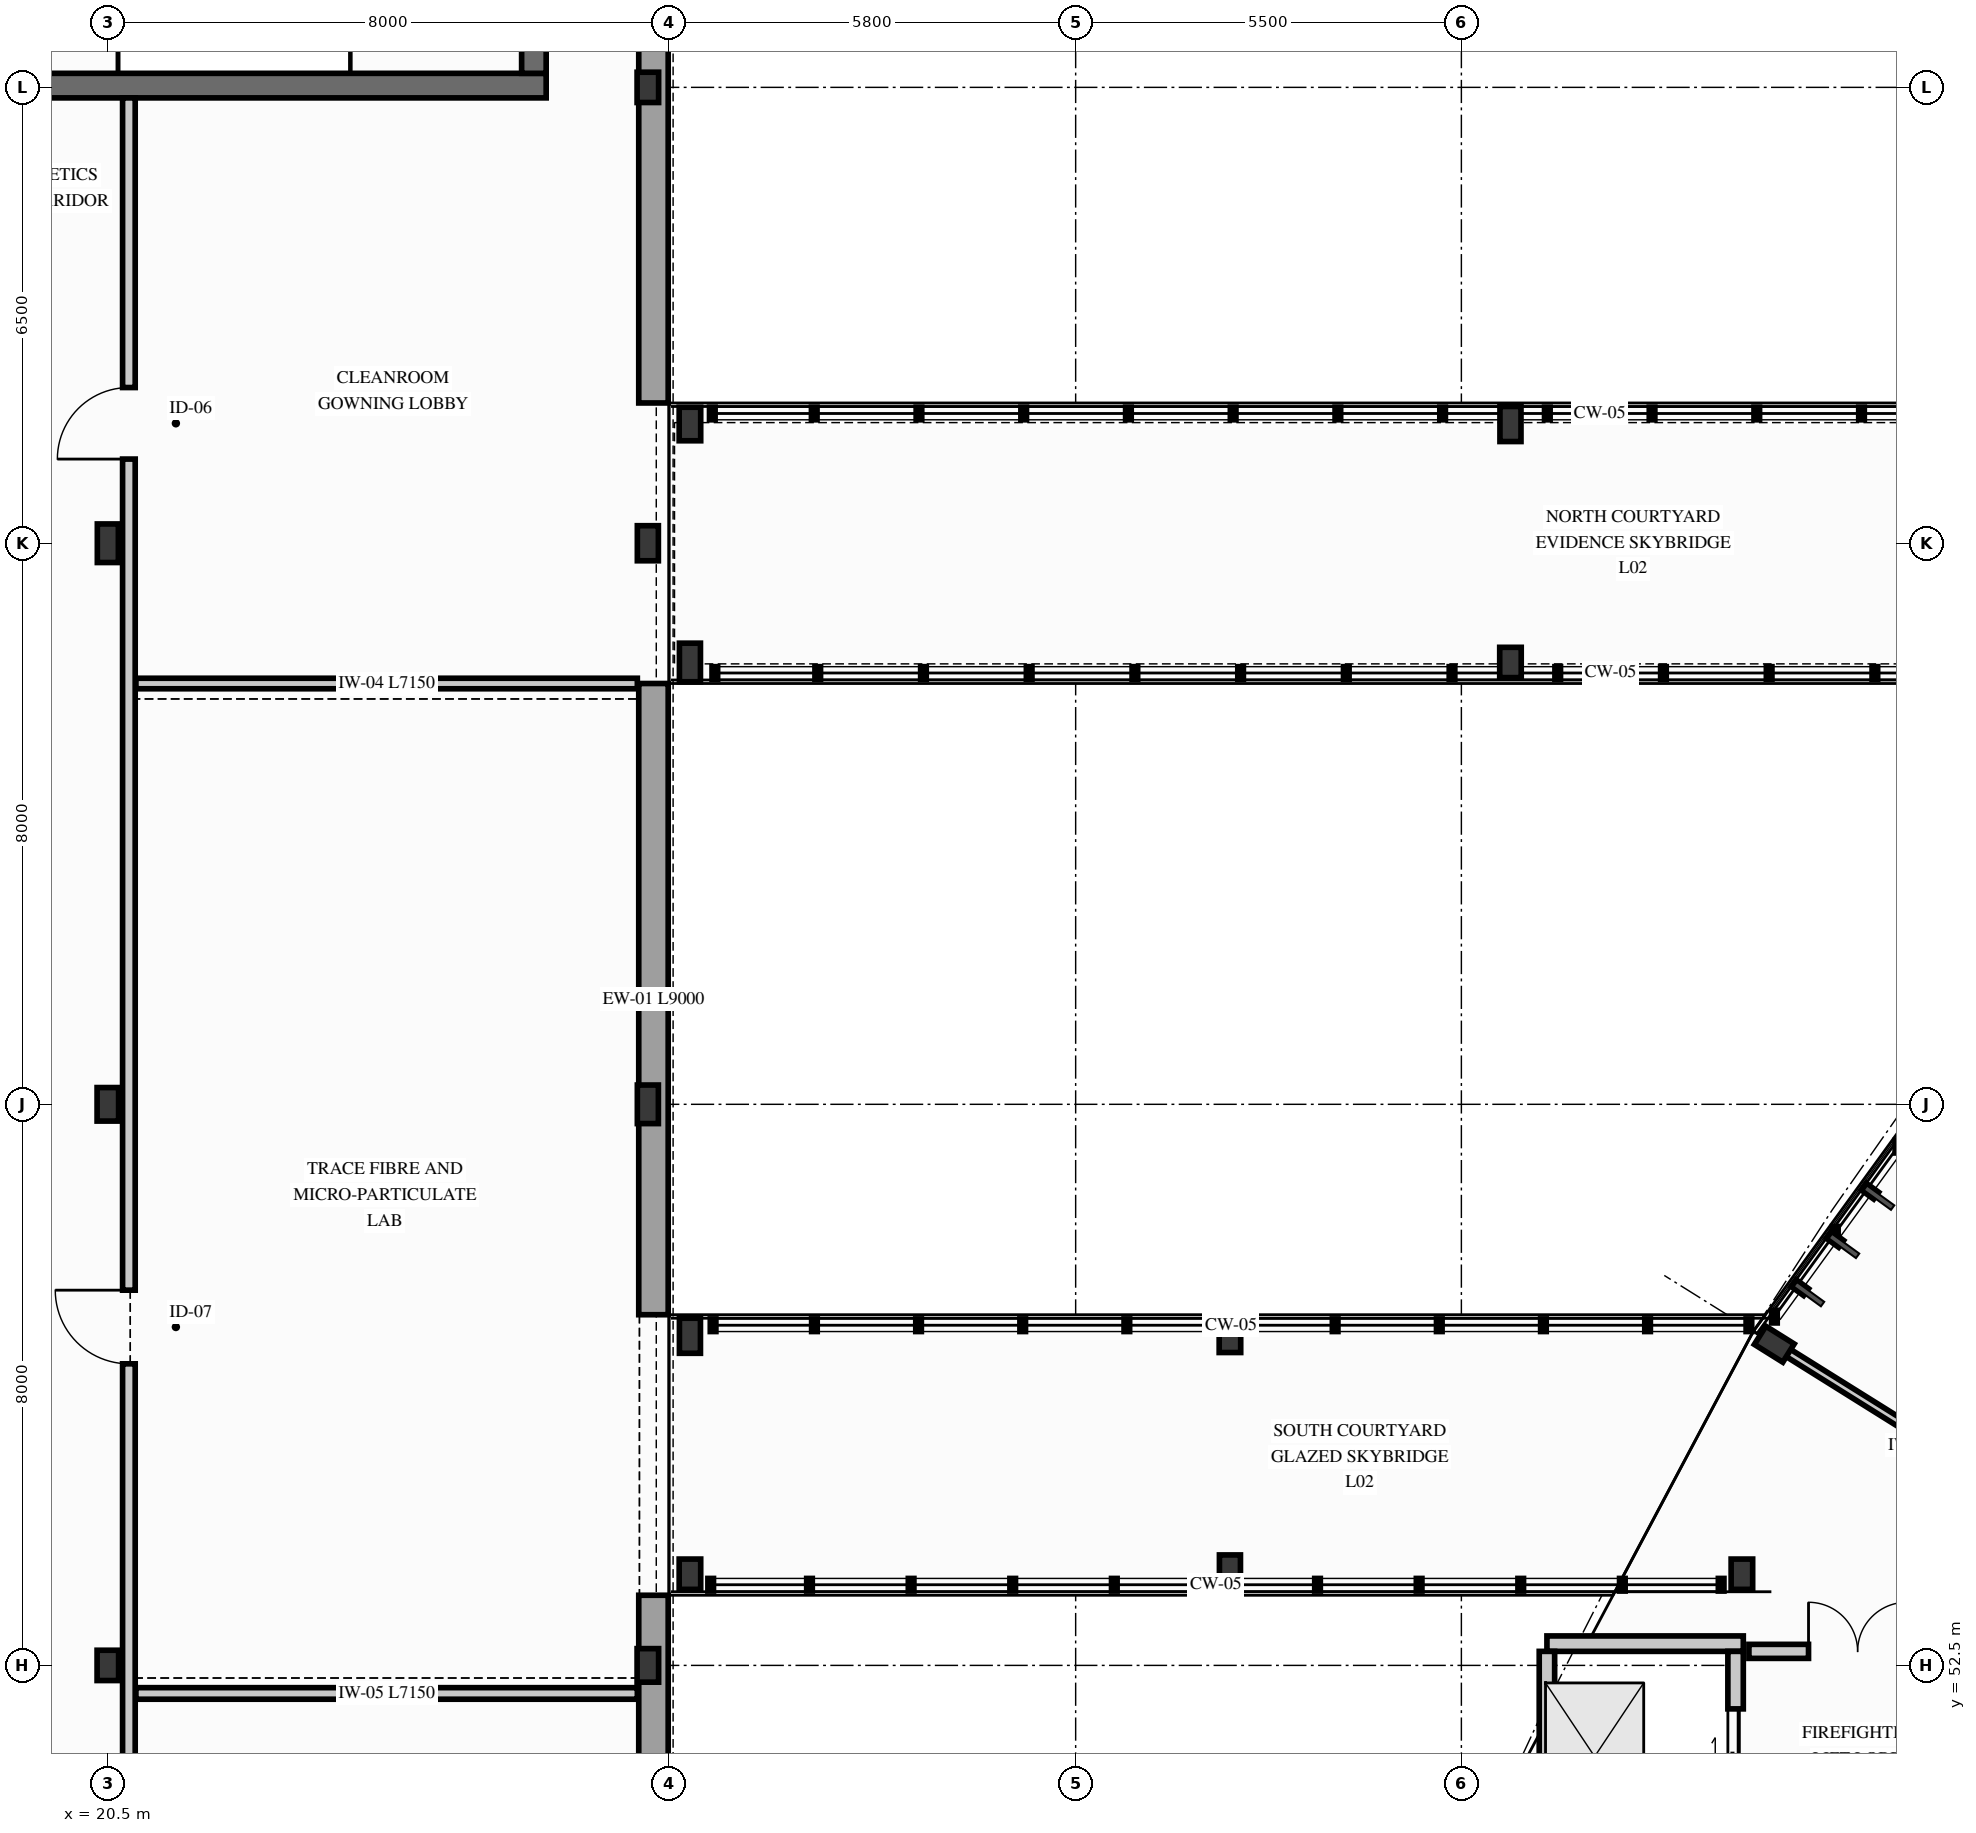
"""IFC4 building model, lengths in metres.
Left out: names, types, materials, properties, quantities, classifications, styles, units other than length and angle.
Written with IfcOpenShell. Run it as: python <this file> out.ifc"""

import sys

from ifc_helpers import new_model, si_unit, direction, frame, frame_2d, origin, origin_2d, place, context, subcontext, project, spatial, rectangle, i_section, extrude, element, fill, save


model = new_model("IFC4")
c1 = context("Model", 3, precision=1e-05, world=origin(), true_north=direction((0.0, 1.0)))
c2 = subcontext(c1, "Body", "Model", "MODEL_VIEW")
j1 = project(units=[si_unit("LENGTHUNIT", "METRE"), si_unit("PLANEANGLEUNIT", "RADIAN")], contexts=[c1])
p1 = place(None, origin())
s1 = spatial("IfcSite", under=j1, at=p1, CompositionType="ELEMENT")
p2 = place(p1, origin())
s2 = spatial("IfcBuilding", under=s1, at=p2, CompositionType="ELEMENT")
p3 = place(p2, frame((0.0, 0.0, 9.3)))
s3 = spatial("IfcBuildingStorey", under=s2, at=p3, CompositionType="ELEMENT", Elevation=9.3)
p4 = place(p3, frame((18.45, 75.025, 0.0), z_axis=(0.0, 0.0, 1.0), x_axis=(1.0, 0.0, 0.0)))
e1 = element("IfcWall", 1, at=p4, inside=s3, PredefinedType="SHEAR", context=c2, shape_type="SweptSolid", body=[
    extrude(rectangle(XDim=8.3, YDim=0.35, at=frame_2d((4.15, 0.0))), origin(), (0.0, 0.0, 1.0), 4.0),
])
p5 = place(p3, frame((26.575, 75.2, 0.0), z_axis=(0.0, 0.0, 1.0), x_axis=(0.0, 1.0, 0.0)))
e2 = element("IfcWall", 2, at=p5, inside=s3, PredefinedType="SHEAR", context=c2, shape_type="SweptSolid", body=[
    extrude(rectangle(XDim=6.8, YDim=0.35, at=frame_2d((3.4, 0.0))), origin(), (0.0, 0.0, 1.0), 4.0),
])
p6 = place(p3, frame((44.262, 57.08, 0.0), z_axis=(0.0, 0.0, 1.0), x_axis=(0.529919264233, 0.848048096156, 0.0)))
e3 = element("IfcColumn", 3, at=p6, inside=s3, PredefinedType="COLUMN", context=c2, shape_type="SweptSolid", body=[
    extrude(i_section(OverallWidth=0.307, OverallDepth=0.478, WebThickness=0.021, FlangeThickness=0.04, FilletRadius=0.027, at=origin_2d()), origin(), (0.0, 0.0, 1.0), 4.2),
])
p7 = place(p3, frame((43.8, 53.8, 0.0), z_axis=(0.0, 0.0, 1.0), x_axis=(1.0, 0.0, 0.0)))
e4 = element("IfcColumn", 4, at=p7, inside=s3, PredefinedType="COLUMN", context=c2, shape_type="SweptSolid", body=[
    extrude(i_section(OverallWidth=0.307, OverallDepth=0.432, WebThickness=0.021, FlangeThickness=0.04, FilletRadius=0.027, at=origin_2d()), origin(), (0.0, 0.0, 1.0), 4.2),
])
p8 = place(p3, frame((36.5, 57.2, 0.0), z_axis=(0.0, 0.0, 1.0), x_axis=(1.0, 0.0, 0.0)))
e5 = element("IfcColumn", 5, at=p8, inside=s3, PredefinedType="COLUMN", context=c2, shape_type="SweptSolid", body=[
    extrude(i_section(OverallWidth=0.307, OverallDepth=0.478, WebThickness=0.021, FlangeThickness=0.04, FilletRadius=0.027, at=origin_2d()), origin(), (0.0, 0.0, 1.0), 4.2),
])
p9 = place(p3, frame((36.5, 53.8, 0.0), z_axis=(0.0, 0.0, 1.0), x_axis=(1.0, 0.0, 0.0)))
e6 = element("IfcColumn", 6, at=p9, inside=s3, PredefinedType="COLUMN", context=c2, shape_type="SweptSolid", body=[
    extrude(i_section(OverallWidth=0.3, OverallDepth=0.55, WebThickness=0.015, FlangeThickness=0.029, FilletRadius=0.027, at=origin_2d()), origin(), (0.0, 0.0, 1.0), 4.2),
])
p10 = place(p3, frame((28.8, 57.2, 0.0), z_axis=(0.0, 0.0, 1.0), x_axis=(1.0, 0.0, 0.0)))
e7 = element("IfcColumn", 7, at=p10, inside=s3, PredefinedType="COLUMN", context=c2, shape_type="SweptSolid", body=[
    extrude(i_section(OverallWidth=0.3, OverallDepth=0.5, WebThickness=0.014, FlangeThickness=0.028, FilletRadius=0.027, at=origin_2d()), origin(), (0.0, 0.0, 1.0), 4.2),
])
p11 = place(p3, frame((28.8, 53.8, 0.0), z_axis=(0.0, 0.0, 1.0), x_axis=(1.0, 0.0, 0.0)))
e8 = element("IfcColumn", 8, at=p11, inside=s3, PredefinedType="COLUMN", context=c2, shape_type="SweptSolid", body=[
    extrude(i_section(OverallWidth=0.307, OverallDepth=0.432, WebThickness=0.021, FlangeThickness=0.04, FilletRadius=0.027, at=origin_2d()), origin(), (0.0, 0.0, 1.0), 4.2),
])
p12 = place(p3, frame((40.5, 70.2, 0.0), z_axis=(0.0, 0.0, 1.0), x_axis=(1.0, 0.0, 0.0)))
e9 = element("IfcColumn", 9, at=p12, inside=s3, PredefinedType="COLUMN", context=c2, shape_type="SweptSolid", body=[
    extrude(i_section(OverallWidth=0.3, OverallDepth=0.5, WebThickness=0.014, FlangeThickness=0.028, FilletRadius=0.027, at=origin_2d()), origin(), (0.0, 0.0, 1.0), 3.94),
])
p13 = place(p3, frame((40.5, 66.8, 0.0), z_axis=(0.0, 0.0, 1.0), x_axis=(1.0, 0.0, 0.0)))
e10 = element("IfcColumn", 10, at=p13, inside=s3, PredefinedType="COLUMN", context=c2, shape_type="SweptSolid", body=[
    extrude(i_section(OverallWidth=0.307, OverallDepth=0.432, WebThickness=0.021, FlangeThickness=0.04, FilletRadius=0.027, at=origin_2d()), origin(), (0.0, 0.0, 1.0), 3.94),
])
p14 = place(p3, frame((28.8, 70.2, 0.0), z_axis=(0.0, 0.0, 1.0), x_axis=(1.0, 0.0, 0.0)))
e11 = element("IfcColumn", 11, at=p14, inside=s3, PredefinedType="COLUMN", context=c2, shape_type="SweptSolid", body=[
    extrude(i_section(OverallWidth=0.307, OverallDepth=0.478, WebThickness=0.021, FlangeThickness=0.04, FilletRadius=0.027, at=origin_2d()), origin(), (0.0, 0.0, 1.0), 3.94),
])
p15 = place(p3, frame((28.8, 66.8, 0.0), z_axis=(0.0, 0.0, 1.0), x_axis=(1.0, 0.0, 0.0)))
e12 = element("IfcColumn", 12, at=p15, inside=s3, PredefinedType="COLUMN", context=c2, shape_type="SweptSolid", body=[
    extrude(i_section(OverallWidth=0.3, OverallDepth=0.55, WebThickness=0.015, FlangeThickness=0.029, FilletRadius=0.027, at=origin_2d()), origin(), (0.0, 0.0, 1.0), 3.94),
])
p16 = place(p3, frame((20.5, 52.5, 0.0), z_axis=(0.0, 0.0, 1.0), x_axis=(1.0, 0.0, 0.0)))
e13 = element("IfcColumn", 13, at=p16, inside=s3, PredefinedType="COLUMN", context=c2, shape_type="SweptSolid", body=[
    extrude(i_section(OverallWidth=0.307, OverallDepth=0.432, WebThickness=0.021, FlangeThickness=0.04, FilletRadius=0.027, at=origin_2d()), origin(), (0.0, 0.0, 1.0), 4.2),
])
p17 = place(p3, frame((20.5, 60.5, 0.0), z_axis=(0.0, 0.0, 1.0), x_axis=(1.0, 0.0, 0.0)))
e14 = element("IfcColumn", 14, at=p17, inside=s3, PredefinedType="COLUMN", context=c2, shape_type="SweptSolid", body=[
    extrude(i_section(OverallWidth=0.307, OverallDepth=0.478, WebThickness=0.021, FlangeThickness=0.04, FilletRadius=0.027, at=origin_2d()), origin(), (0.0, 0.0, 1.0), 4.2),
])
p18 = place(p3, frame((20.5, 68.5, 0.0), z_axis=(0.0, 0.0, 1.0), x_axis=(1.0, 0.0, 0.0)))
e15 = element("IfcColumn", 15, at=p18, inside=s3, PredefinedType="COLUMN", context=c2, shape_type="SweptSolid", body=[
    extrude(i_section(OverallWidth=0.3, OverallDepth=0.55, WebThickness=0.015, FlangeThickness=0.029, FilletRadius=0.027, at=origin_2d()), origin(), (0.0, 0.0, 1.0), 4.2),
])
p19 = place(p3, frame((28.2, 52.5, 0.0), z_axis=(0.0, 0.0, 1.0), x_axis=(1.0, 0.0, 0.0)))
e16 = element("IfcColumn", 16, at=p19, inside=s3, PredefinedType="COLUMN", context=c2, shape_type="SweptSolid", body=[
    extrude(i_section(OverallWidth=0.307, OverallDepth=0.478, WebThickness=0.021, FlangeThickness=0.04, FilletRadius=0.027, at=origin_2d()), origin(), (0.0, 0.0, 1.0), 4.2),
])
p20 = place(p3, frame((28.2, 60.5, 0.0), z_axis=(0.0, 0.0, 1.0), x_axis=(1.0, 0.0, 0.0)))
e17 = element("IfcColumn", 17, at=p20, inside=s3, PredefinedType="COLUMN", context=c2, shape_type="SweptSolid", body=[
    extrude(i_section(OverallWidth=0.3, OverallDepth=0.55, WebThickness=0.015, FlangeThickness=0.029, FilletRadius=0.027, at=origin_2d()), origin(), (0.0, 0.0, 1.0), 4.2),
])
p21 = place(p3, frame((28.2, 68.5, 0.0), z_axis=(0.0, 0.0, 1.0), x_axis=(1.0, 0.0, 0.0)))
e18 = element("IfcColumn", 18, at=p21, inside=s3, PredefinedType="COLUMN", context=c2, shape_type="SweptSolid", body=[
    extrude(i_section(OverallWidth=0.3, OverallDepth=0.5, WebThickness=0.014, FlangeThickness=0.028, FilletRadius=0.027, at=origin_2d()), origin(), (0.0, 0.0, 1.0), 4.2),
])
p22 = place(p3, frame((28.2, 75.0, 0.0), z_axis=(0.0, 0.0, 1.0), x_axis=(1.0, 0.0, 0.0)))
e19 = element("IfcColumn", 19, at=p22, inside=s3, PredefinedType="COLUMN", context=c2, shape_type="SweptSolid", body=[
    extrude(i_section(OverallWidth=0.307, OverallDepth=0.432, WebThickness=0.021, FlangeThickness=0.04, FilletRadius=0.027, at=origin_2d()), origin(), (0.0, 0.0, 1.0), 4.2),
])
p23 = place(p3, frame((28.28, 36.5, 0.0), z_axis=(0.0, 0.0, 1.0), x_axis=(0.0, 1.0, 0.0)))
e20 = element("IfcWall", 20, at=p23, inside=s3, PredefinedType="SOLIDWALL", context=c2, shape_type="SweptSolid", body=[
    extrude(rectangle(XDim=17.0, YDim=0.42, at=frame_2d((8.5, 0.0))), origin(), (0.0, 0.0, 1.0), 3.68),
])
p24 = place(p23, frame((1.65, 0.0, 0.74)))
e21 = element("IfcOpeningElement", 21, at=p24, cuts=e20, PredefinedType="OPENING", context=c2, shape_type="SweptSolid", body=[
    extrude(rectangle(XDim=1.6, YDim=2.4, at=frame_2d((0.8, 1.2))), frame((0.0, 0.22, 0.0), z_axis=(0.0, -1.0, 0.0), x_axis=(1.0, 0.0, 0.0)), (0.0, 0.0, 1.0), 0.44),
])
p25 = place(p23, frame((5.65, 0.0, 0.74)))
e22 = element("IfcOpeningElement", 22, at=p25, cuts=e20, PredefinedType="OPENING", context=c2, shape_type="SweptSolid", body=[
    extrude(rectangle(XDim=1.8, YDim=2.4, at=frame_2d((0.9, 1.2))), frame((0.0, 0.22, 0.0), z_axis=(0.0, -1.0, 0.0), x_axis=(1.0, 0.0, 0.0)), (0.0, 0.0, 1.0), 0.44),
])
p26 = place(p23, frame((9.65, 0.0, 0.84)))
e23 = element("IfcOpeningElement", 23, at=p26, cuts=e20, PredefinedType="OPENING", context=c2, shape_type="SweptSolid", body=[
    extrude(rectangle(XDim=1.5, YDim=2.3, at=frame_2d((0.75, 1.15))), frame((0.0, 0.22, 0.0), z_axis=(0.0, -1.0, 0.0), x_axis=(1.0, 0.0, 0.0)), (0.0, 0.0, 1.0), 0.44),
])
p27 = place(p3, frame((28.28, 57.5, 0.0), z_axis=(0.0, 0.0, 1.0), x_axis=(0.0, 1.0, 0.0)))
e24 = element("IfcWall", 24, at=p27, inside=s3, PredefinedType="SOLIDWALL", context=c2, shape_type="SweptSolid", body=[
    extrude(rectangle(XDim=9.0, YDim=0.42, at=frame_2d((4.5, 0.0))), origin(), (0.0, 0.0, 1.0), 3.68),
])
p28 = place(p3, frame((28.28, 70.5, 0.0), z_axis=(0.0, 0.0, 1.0), x_axis=(0.0, 1.0, 0.0)))
e25 = element("IfcWall", 25, at=p28, inside=s3, PredefinedType="SOLIDWALL", context=c2, shape_type="SweptSolid", body=[
    extrude(rectangle(XDim=13.0, YDim=0.42, at=frame_2d((6.5, 0.0))), origin(), (0.0, 0.0, 1.0), 3.68),
])
p29 = place(p28, frame((5.65, 0.0, 0.74)))
e26 = element("IfcOpeningElement", 26, at=p29, cuts=e25, PredefinedType="OPENING", context=c2, shape_type="SweptSolid", body=[
    extrude(rectangle(XDim=1.8, YDim=2.4, at=frame_2d((0.9, 1.2))), frame((0.0, 0.22, 0.0), z_axis=(0.0, -1.0, 0.0), x_axis=(1.0, 0.0, 0.0)), (0.0, 0.0, 1.0), 0.44),
])
p30 = place(p3, frame((41.02, 52.81, 0.0), z_axis=(0.0, 0.0, 1.0), x_axis=(1.0, 0.0, 0.0)))
e27 = element("IfcWall", 27, at=p30, inside=s3, PredefinedType="PARTITIONING", context=c2, shape_type="SweptSolid", body=[
    extrude(rectangle(XDim=2.8, YDim=0.22, at=frame_2d((1.4, 0.0))), origin(), (0.0, 0.0, 1.0), 3.92),
])
p31 = place(p3, frame((41.02, 49.76, 0.0), z_axis=(0.0, 0.0, 1.0), x_axis=(0.0, 1.0, 0.0)))
e28 = element("IfcWall", 28, at=p31, inside=s3, PredefinedType="PARTITIONING", context=c2, shape_type="SweptSolid", body=[
    extrude(rectangle(XDim=2.94, YDim=0.22, at=frame_2d((1.47, 0.0))), origin(), (0.0, 0.0, 1.0), 3.92),
])
p32 = place(p3, frame((43.71, 49.76, 0.0), z_axis=(0.0, 0.0, 1.0), x_axis=(0.0, 1.0, 0.0)))
e29 = element("IfcWall", 29, at=p32, inside=s3, PredefinedType="PARTITIONING", context=c2, shape_type="SweptSolid", body=[
    extrude(rectangle(XDim=2.94, YDim=0.22, at=frame_2d((1.47, 0.0))), origin(), (0.0, 0.0, 1.0), 3.92),
])
p33 = place(p32, frame((0.82, 0.0, 0.0)))
e30 = element("IfcOpeningElement", 30, at=p33, cuts=e29, PredefinedType="OPENING", context=c2, shape_type="SweptSolid", body=[
    extrude(rectangle(XDim=1.3, YDim=2.2, at=frame_2d((0.65, 1.1))), frame((0.0, 0.12, 0.0), z_axis=(0.0, -1.0, 0.0), x_axis=(1.0, 0.0, 0.0)), (0.0, 0.0, 1.0), 0.24),
])
p34 = place(p3, frame((43.9, 52.7, 0.0), z_axis=(0.0, 0.0, 1.0), x_axis=(1.0, 0.0, 0.0)))
e31 = element("IfcWall", 31, at=p34, inside=s3, PredefinedType="PARTITIONING", context=c2, shape_type="SweptSolid", body=[
    extrude(rectangle(XDim=3.4, YDim=0.2, at=frame_2d((1.7, 0.0))), origin(), (0.0, 0.0, 1.0), 3.92),
])
p35 = place(p34, frame((0.85, 0.0, 0.0)))
e32 = element("IfcOpeningElement", 32, at=p35, cuts=e31, PredefinedType="OPENING", context=c2, shape_type="SweptSolid", body=[
    extrude(rectangle(XDim=1.4, YDim=2.25, at=frame_2d((0.7, 1.125))), frame((0.0, 0.11, 0.0), z_axis=(0.0, -1.0, 0.0), x_axis=(1.0, 0.0, 0.0)), (0.0, 0.0, 1.0), 0.22),
])
p36 = place(p3, frame((20.8, 36.8, 0.0), z_axis=(0.0, 0.0, 1.0), x_axis=(0.0, 1.0, 0.0)))
e33 = element("IfcWall", 33, at=p36, inside=s3, PredefinedType="PARTITIONING", context=c2, shape_type="SweptSolid", body=[
    extrude(rectangle(XDim=38.05, YDim=0.18, at=frame_2d((19.025, 0.0))), origin(), (0.0, 0.0, 1.0), 3.678),
])
p37 = place(p36, frame((5.65, 0.0, 0.0)))
e34 = element("IfcOpeningElement", 34, at=p37, cuts=e33, PredefinedType="OPENING", context=c2, shape_type="SweptSolid", body=[
    extrude(rectangle(XDim=1.08, YDim=2.22, at=frame_2d((0.54, 1.11))), frame((0.0, 0.1, 0.0), z_axis=(0.0, -1.0, 0.0), x_axis=(1.0, 0.0, 0.0)), (0.0, 0.0, 1.0), 0.2),
])
p38 = place(p36, frame((20.0, 0.0, 0.0)))
e35 = element("IfcOpeningElement", 35, at=p38, cuts=e33, PredefinedType="OPENING", context=c2, shape_type="SweptSolid", body=[
    extrude(rectangle(XDim=1.05, YDim=2.2, at=frame_2d((0.525, 1.1))), frame((0.0, 0.1, 0.0), z_axis=(0.0, -1.0, 0.0), x_axis=(1.0, 0.0, 0.0)), (0.0, 0.0, 1.0), 0.2),
])
p39 = place(p36, frame((32.9, 0.0, 0.0)))
e36 = element("IfcOpeningElement", 36, at=p39, cuts=e33, PredefinedType="OPENING", context=c2, shape_type="SweptSolid", body=[
    extrude(rectangle(XDim=1.02, YDim=2.18, at=frame_2d((0.51, 1.09))), frame((0.0, 0.1, 0.0), z_axis=(0.0, -1.0, 0.0), x_axis=(1.0, 0.0, 0.0)), (0.0, 0.0, 1.0), 0.2),
])
p40 = place(p3, frame((20.9, 52.1, 0.0), z_axis=(0.0, 0.0, 1.0), x_axis=(1.0, 0.0, 0.0)))
e37 = element("IfcWall", 37, at=p40, inside=s3, PredefinedType="PARTITIONING", context=c2, shape_type="SweptSolid", body=[
    extrude(rectangle(XDim=7.15, YDim=0.165, at=frame_2d((3.575, 0.0))), origin(), (0.0, 0.0, 1.0), 3.92),
])
p41 = place(p3, frame((20.9, 66.5, 0.0), z_axis=(0.0, 0.0, 1.0), x_axis=(1.0, 0.0, 0.0)))
e38 = element("IfcWall", 38, at=p41, inside=s3, PredefinedType="PARTITIONING", context=c2, shape_type="SweptSolid", body=[
    extrude(rectangle(XDim=7.15, YDim=0.15, at=frame_2d((3.575, 0.0))), origin(), (0.0, 0.0, 1.0), 3.92),
])
p42 = place(p3, frame((48.757, 54.271, 0.0), z_axis=(0.0, 0.0, 1.0), x_axis=(-0.848054228257, 0.529909450694, 0.0)))
e39 = element("IfcWall", 39, at=p42, inside=s3, PredefinedType="PARTITIONING", context=c2, shape_type="SweptSolid", body=[
    extrude(rectangle(XDim=5.15, YDim=0.12, at=frame_2d((2.575, 0.0))), origin(), (0.0, 0.0, 1.0), 3.55),
])
p43 = place(p33, origin())
e40 = element("IfcDoor", 40, at=p43, inside=s3, OperationType="DOUBLE_DOOR_SLIDING", PredefinedType="DOOR", context=c2, shape_type="SweptSolid", body=[
    extrude(rectangle(XDim=1.3, YDim=2.2, at=frame_2d((0.65, 1.1))), frame((0.0, 0.025, 0.0), z_axis=(0.0, -1.0, 0.0), x_axis=(1.0, 0.0, 0.0)), (0.0, 0.0, 1.0), 0.05),
])
fill(e30, e40)
p44 = place(p35, origin())
e41 = element("IfcDoor", 41, at=p44, inside=s3, OperationType="DOUBLE_DOOR_SINGLE_SWING", PredefinedType="DOOR", context=c2, shape_type="SweptSolid", body=[
    extrude(rectangle(XDim=1.4, YDim=2.25, at=frame_2d((0.7, 1.125))), frame((0.0, 0.025, 0.0), z_axis=(0.0, -1.0, 0.0), x_axis=(1.0, 0.0, 0.0)), (0.0, 0.0, 1.0), 0.05),
])
fill(e32, e41)
p45 = place(p38, origin())
e42 = element("IfcDoor", 42, at=p45, inside=s3, OperationType="SINGLE_SWING_RIGHT", PredefinedType="DOOR", context=c2, shape_type="SweptSolid", body=[
    extrude(rectangle(XDim=1.05, YDim=2.2, at=frame_2d((0.525, 1.1))), frame((0.0, 0.025, 0.0), z_axis=(0.0, -1.0, 0.0), x_axis=(1.0, 0.0, 0.0)), (0.0, 0.0, 1.0), 0.05),
])
fill(e35, e42)
p46 = place(p39, origin())
e43 = element("IfcDoor", 43, at=p46, inside=s3, OperationType="SINGLE_SWING_LEFT", PredefinedType="DOOR", context=c2, shape_type="SweptSolid", body=[
    extrude(rectangle(XDim=1.02, YDim=2.18, at=frame_2d((0.51, 1.09))), frame((0.0, 0.025, 0.0), z_axis=(0.0, -1.0, 0.0), x_axis=(1.0, 0.0, 0.0)), (0.0, 0.0, 1.0), 0.05),
])
fill(e36, e43)
save(model, sys.argv[1])
